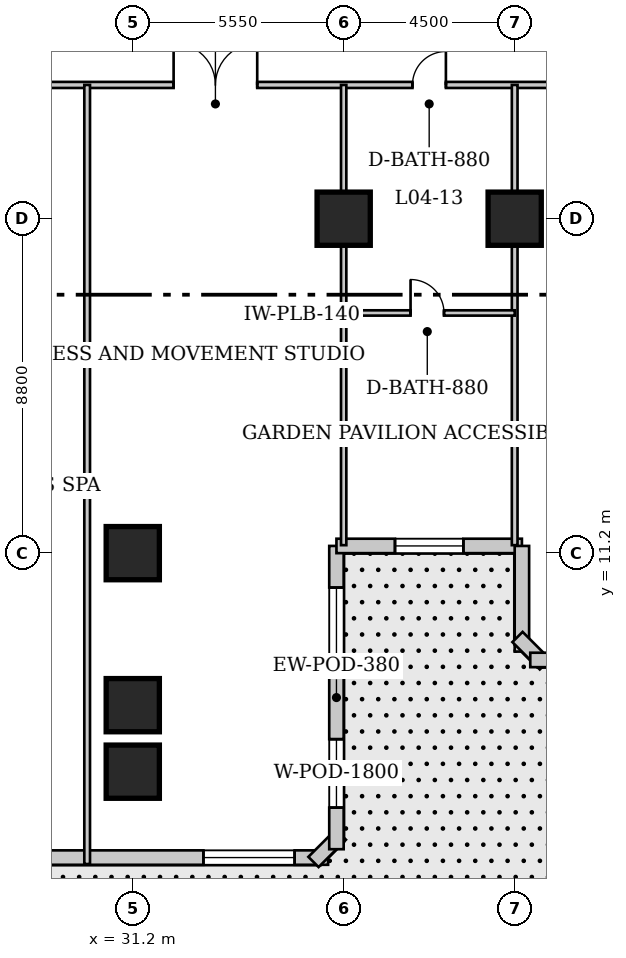
"""IFC4 building model, lengths in metres.
Left out: names, types, materials, properties, quantities, classifications, styles, units other than length and angle.
Written with IfcOpenShell. Run it as: python <this file> out.ifc"""

import sys

from ifc_helpers import new_model, si_unit, direction, frame, frame_2d, origin, origin_2d, place, context, subcontext, project, spatial, rectangle, extrude, element, fill, save


model = new_model("IFC4")
c1 = context("Model", 3, precision=1e-05, world=origin(), true_north=direction((0.0, 1.0)))
c2 = subcontext(c1, "Body", "Model", "MODEL_VIEW")
j1 = project(units=[si_unit("LENGTHUNIT", "METRE"), si_unit("PLANEANGLEUNIT", "RADIAN")], contexts=[c1])
p1 = place(None, origin())
s1 = spatial("IfcSite", under=j1, at=p1, CompositionType="ELEMENT")
p2 = place(p1, origin())
s2 = spatial("IfcBuilding", under=s1, at=p2, CompositionType="ELEMENT")
p3 = place(p2, frame((0.0, 0.0, 20.8)))
s3 = spatial("IfcBuildingStorey", under=s2, at=p3, CompositionType="ELEMENT", Elevation=20.8)
for number, where, z_axis, x_axis in (
    (1, (31.2, 11.2, 0.0), (0.0, 0.0, 1.0), (1.0, 0.0, 0.0)),
    (2, (36.75, 20.0, 0.0), (0.0, 0.0, 1.0), (1.0, 0.0, 0.0)),
    (3, (41.25, 20.0, 0.0), (0.0, 0.0, 1.0), (1.0, 0.0, 0.0)),
    (4, (31.2, 7.2, 0.0), (0.0, 0.0, 1.0), (1.0, 0.0, 0.0)),
    (5, (31.2, 5.45, 0.0), (0.0, 0.0, 1.0), (1.0, 0.0, 0.0)),
):
    element("IfcColumn", number, at=place(p3, frame(where, z_axis=z_axis, x_axis=x_axis)), inside=s3, PredefinedType="COLUMN", context=c2, shape_type="SweptSolid", body=[
        extrude(rectangle(XDim=1.4, YDim=1.4, at=origin_2d()), origin(), (0.0, 0.0, 1.0), 5.2),
    ])
p4 = place(p3, frame((7.21, 3.19, 0.0), z_axis=(0.0, 0.0, 1.0), x_axis=(1.0, 0.0, 0.0)))
e6 = element("IfcWall", 6, at=p4, inside=s3, PredefinedType="SOLIDWALL", context=c2, shape_type="SweptSolid", body=[
    extrude(rectangle(XDim=29.13, YDim=0.38, at=frame_2d((14.565, 0.0))), origin(), (0.0, 0.0, 1.0), 4.94),
])
p5 = place(p4, frame((13.865, 0.0, 0.0)))
e7 = element("IfcOpeningElement", 7, at=p5, cuts=e6, PredefinedType="OPENING", context=c2, shape_type="SweptSolid", body=[
    extrude(rectangle(XDim=1.4, YDim=2.15, at=frame_2d((0.7, 1.075))), frame((0.0, 0.2, 0.0), z_axis=(0.0, -1.0, 0.0), x_axis=(1.0, 0.0, 0.0)), (0.0, 0.0, 1.0), 0.4),
])
p6 = place(p4, frame((9.204, 0.0, 0.75)))
e8 = element("IfcOpeningElement", 8, at=p6, cuts=e6, PredefinedType="OPENING", context=c2, shape_type="SweptSolid", body=[
    extrude(rectangle(XDim=2.4, YDim=2.2, at=frame_2d((1.2, 1.1))), frame((0.0, 0.2, 0.0), z_axis=(0.0, -1.0, 0.0), x_axis=(1.0, 0.0, 0.0)), (0.0, 0.0, 1.0), 0.4),
])
p7 = place(p4, frame((17.526, 0.0, 0.75)))
e9 = element("IfcOpeningElement", 9, at=p7, cuts=e6, PredefinedType="OPENING", context=c2, shape_type="SweptSolid", body=[
    extrude(rectangle(XDim=2.4, YDim=2.2, at=frame_2d((1.2, 1.1))), frame((0.0, 0.2, 0.0), z_axis=(0.0, -1.0, 0.0), x_axis=(1.0, 0.0, 0.0)), (0.0, 0.0, 1.0), 0.4),
])
p8 = place(p4, frame((25.849, 0.0, 0.75)))
e10 = element("IfcOpeningElement", 10, at=p8, cuts=e6, PredefinedType="OPENING", context=c2, shape_type="SweptSolid", body=[
    extrude(rectangle(XDim=2.4, YDim=2.2, at=frame_2d((1.2, 1.1))), frame((0.0, 0.2, 0.0), z_axis=(0.0, -1.0, 0.0), x_axis=(1.0, 0.0, 0.0)), (0.0, 0.0, 1.0), 0.4),
])
p9 = place(p3, frame((35.956, 3.074, 0.0), z_axis=(0.0, 0.0, 1.0), x_axis=(0.707106781187, 0.707106781187, 0.0)))
e11 = element("IfcWall", 11, at=p9, inside=s3, PredefinedType="SOLIDWALL", context=c2, shape_type="SweptSolid", body=[
    extrude(rectangle(XDim=1.019, YDim=0.38, at=frame_2d((0.509, 0.0))), origin(), (0.0, 0.0, 1.0), 4.94),
])
p10 = place(p3, frame((36.56, 3.41, 0.0), z_axis=(0.0, 0.0, 1.0), x_axis=(0.0, 1.0, 0.0)))
e12 = element("IfcWall", 12, at=p10, inside=s3, PredefinedType="SOLIDWALL", context=c2, shape_type="SweptSolid", body=[
    extrude(rectangle(XDim=7.98, YDim=0.38, at=frame_2d((3.99, 0.0))), origin(), (0.0, 0.0, 1.0), 4.94),
])
p11 = place(p10, frame((1.095, 0.0, 0.8)))
e13 = element("IfcOpeningElement", 13, at=p11, cuts=e12, PredefinedType="OPENING", context=c2, shape_type="SweptSolid", body=[
    extrude(rectangle(XDim=1.8, YDim=2.1, at=frame_2d((0.9, 1.05))), frame((0.0, 0.2, 0.0), z_axis=(0.0, -1.0, 0.0), x_axis=(1.0, 0.0, 0.0)), (0.0, 0.0, 1.0), 0.4),
])
p12 = place(p10, frame((5.085, 0.0, 0.8)))
e14 = element("IfcOpeningElement", 14, at=p12, cuts=e12, PredefinedType="OPENING", context=c2, shape_type="SweptSolid", body=[
    extrude(rectangle(XDim=1.8, YDim=2.1, at=frame_2d((0.9, 1.05))), frame((0.0, 0.2, 0.0), z_axis=(0.0, -1.0, 0.0), x_axis=(1.0, 0.0, 0.0)), (0.0, 0.0, 1.0), 0.4),
])
p13 = place(p3, frame((36.56, 11.39, 0.0), z_axis=(0.0, 0.0, 1.0), x_axis=(1.0, 0.0, 0.0)))
e15 = element("IfcWall", 15, at=p13, inside=s3, PredefinedType="SOLIDWALL", context=c2, shape_type="SweptSolid", body=[
    extrude(rectangle(XDim=4.88, YDim=0.38, at=frame_2d((2.44, 0.0))), origin(), (0.0, 0.0, 1.0), 4.94),
])
p14 = place(p13, frame((1.54, 0.0, 0.8)))
e16 = element("IfcOpeningElement", 16, at=p14, cuts=e15, PredefinedType="OPENING", context=c2, shape_type="SweptSolid", body=[
    extrude(rectangle(XDim=1.8, YDim=2.1, at=frame_2d((0.9, 1.05))), frame((0.0, 0.2, 0.0), z_axis=(0.0, -1.0, 0.0), x_axis=(1.0, 0.0, 0.0)), (0.0, 0.0, 1.0), 0.4),
])
p15 = place(p3, frame((41.44, 11.39, 0.0), z_axis=(0.0, 0.0, 1.0), x_axis=(0.0, -1.0, 0.0)))
e17 = element("IfcWall", 17, at=p15, inside=s3, PredefinedType="SOLIDWALL", context=c2, shape_type="SweptSolid", body=[
    extrude(rectangle(XDim=2.78, YDim=0.38, at=frame_2d((1.39, 0.0))), origin(), (0.0, 0.0, 1.0), 4.94),
])
p16 = place(p3, frame((41.324, 8.994, 0.0), z_axis=(0.0, 0.0, 1.0), x_axis=(0.707106781187, -0.707106781187, 0.0)))
e18 = element("IfcWall", 18, at=p16, inside=s3, PredefinedType="SOLIDWALL", context=c2, shape_type="SweptSolid", body=[
    extrude(rectangle(XDim=1.019, YDim=0.38, at=frame_2d((0.509, 0.0))), origin(), (0.0, 0.0, 1.0), 4.94),
])
p17 = place(p3, frame((41.66, 8.39, 0.0), z_axis=(0.0, 0.0, 1.0), x_axis=(1.0, 0.0, 0.0)))
e19 = element("IfcWall", 19, at=p17, inside=s3, PredefinedType="SOLIDWALL", context=c2, shape_type="SweptSolid", body=[
    extrude(rectangle(XDim=29.13, YDim=0.38, at=frame_2d((14.565, 0.0))), origin(), (0.0, 0.0, 1.0), 4.94),
])
p18 = place(p17, frame((0.881, 0.0, 0.75)))
e20 = element("IfcOpeningElement", 20, at=p18, cuts=e19, PredefinedType="OPENING", context=c2, shape_type="SweptSolid", body=[
    extrude(rectangle(XDim=2.4, YDim=2.2, at=frame_2d((1.2, 1.1))), frame((0.0, 0.2, 0.0), z_axis=(0.0, -1.0, 0.0), x_axis=(1.0, 0.0, 0.0)), (0.0, 0.0, 1.0), 0.4),
])
p19 = place(p17, frame((6.192, 0.0, 0.75)))
e21 = element("IfcOpeningElement", 21, at=p19, cuts=e19, PredefinedType="OPENING", context=c2, shape_type="SweptSolid", body=[
    extrude(rectangle(XDim=2.4, YDim=2.2, at=frame_2d((1.2, 1.1))), frame((0.0, 0.2, 0.0), z_axis=(0.0, -1.0, 0.0), x_axis=(1.0, 0.0, 0.0)), (0.0, 0.0, 1.0), 0.4),
])
p20 = place(p17, frame((9.204, 0.0, 0.75)))
e22 = element("IfcOpeningElement", 22, at=p20, cuts=e19, PredefinedType="OPENING", context=c2, shape_type="SweptSolid", body=[
    extrude(rectangle(XDim=2.4, YDim=2.2, at=frame_2d((1.2, 1.1))), frame((0.0, 0.2, 0.0), z_axis=(0.0, -1.0, 0.0), x_axis=(1.0, 0.0, 0.0)), (0.0, 0.0, 1.0), 0.4),
])
p21 = place(p17, frame((14.015, 0.0, 0.75)))
e23 = element("IfcOpeningElement", 23, at=p21, cuts=e19, PredefinedType="OPENING", context=c2, shape_type="SweptSolid", body=[
    extrude(rectangle(XDim=2.4, YDim=2.2, at=frame_2d((1.2, 1.1))), frame((0.0, 0.2, 0.0), z_axis=(0.0, -1.0, 0.0), x_axis=(1.0, 0.0, 0.0)), (0.0, 0.0, 1.0), 0.4),
])
p22 = place(p17, frame((17.526, 0.0, 0.75)))
e24 = element("IfcOpeningElement", 24, at=p22, cuts=e19, PredefinedType="OPENING", context=c2, shape_type="SweptSolid", body=[
    extrude(rectangle(XDim=2.4, YDim=2.2, at=frame_2d((1.2, 1.1))), frame((0.0, 0.2, 0.0), z_axis=(0.0, -1.0, 0.0), x_axis=(1.0, 0.0, 0.0)), (0.0, 0.0, 1.0), 0.4),
])
p23 = place(p17, frame((21.688, 0.0, 0.75)))
e25 = element("IfcOpeningElement", 25, at=p23, cuts=e19, PredefinedType="OPENING", context=c2, shape_type="SweptSolid", body=[
    extrude(rectangle(XDim=2.4, YDim=2.2, at=frame_2d((1.2, 1.1))), frame((0.0, 0.2, 0.0), z_axis=(0.0, -1.0, 0.0), x_axis=(1.0, 0.0, 0.0)), (0.0, 0.0, 1.0), 0.4),
])
p24 = place(p17, frame((25.849, 0.0, 0.75)))
e26 = element("IfcOpeningElement", 26, at=p24, cuts=e19, PredefinedType="OPENING", context=c2, shape_type="SweptSolid", body=[
    extrude(rectangle(XDim=2.4, YDim=2.2, at=frame_2d((1.2, 1.1))), frame((0.0, 0.2, 0.0), z_axis=(0.0, -1.0, 0.0), x_axis=(1.0, 0.0, 0.0)), (0.0, 0.0, 1.0), 0.4),
])
p25 = place(p3, frame((3.22, 23.52, 0.0), z_axis=(0.0, 0.0, 1.0), x_axis=(1.0, 0.0, 0.0)))
e27 = element("IfcWall", 27, at=p25, inside=s3, PredefinedType="PARTITIONING", context=c2, shape_type="SweptSolid", body=[
    extrude(rectangle(XDim=71.56, YDim=0.16, at=frame_2d((35.78, 0.0))), origin(), (0.0, 0.0, 1.0), 4.94),
])
p26 = place(p25, frame((2.19, 0.0, 0.0)))
e28 = element("IfcOpeningElement", 28, at=p26, cuts=e27, PredefinedType="OPENING", context=c2, shape_type="SweptSolid", body=[
    extrude(rectangle(XDim=1.0, YDim=2.15, at=frame_2d((0.5, 1.075))), frame((0.0, 0.09, 0.0), z_axis=(0.0, -1.0, 0.0), x_axis=(1.0, 0.0, 0.0)), (0.0, 0.0, 1.0), 0.18),
])
p27 = place(p25, frame((5.76, 0.0, 0.0)))
e29 = element("IfcOpeningElement", 29, at=p27, cuts=e27, PredefinedType="OPENING", context=c2, shape_type="SweptSolid", body=[
    extrude(rectangle(XDim=1.1, YDim=2.15, at=frame_2d((0.55, 1.075))), frame((0.0, 0.09, 0.0), z_axis=(0.0, -1.0, 0.0), x_axis=(1.0, 0.0, 0.0)), (0.0, 0.0, 1.0), 0.18),
])
p28 = place(p25, frame((9.005, 0.0, 0.0)))
e30 = element("IfcOpeningElement", 30, at=p28, cuts=e27, PredefinedType="OPENING", context=c2, shape_type="SweptSolid", body=[
    extrude(rectangle(XDim=0.95, YDim=2.1, at=frame_2d((0.475, 1.05))), frame((0.0, 0.09, 0.0), z_axis=(0.0, -1.0, 0.0), x_axis=(1.0, 0.0, 0.0)), (0.0, 0.0, 1.0), 0.18),
])
p29 = place(p25, frame((20.43, 0.0, 0.0)))
e31 = element("IfcOpeningElement", 31, at=p29, cuts=e27, PredefinedType="OPENING", context=c2, shape_type="SweptSolid", body=[
    extrude(rectangle(XDim=2.2, YDim=2.4, at=frame_2d((1.1, 1.2))), frame((0.0, 0.09, 0.0), z_axis=(0.0, -1.0, 0.0), x_axis=(1.0, 0.0, 0.0)), (0.0, 0.0, 1.0), 0.18),
])
p30 = place(p25, frame((29.055, 0.0, 0.0)))
e32 = element("IfcOpeningElement", 32, at=p30, cuts=e27, PredefinedType="OPENING", context=c2, shape_type="SweptSolid", body=[
    extrude(rectangle(XDim=2.2, YDim=2.4, at=frame_2d((1.1, 1.2))), frame((0.0, 0.09, 0.0), z_axis=(0.0, -1.0, 0.0), x_axis=(1.0, 0.0, 0.0)), (0.0, 0.0, 1.0), 0.18),
])
p31 = place(p25, frame((47.505, 0.0, 0.0)))
e33 = element("IfcOpeningElement", 33, at=p31, cuts=e27, PredefinedType="OPENING", context=c2, shape_type="SweptSolid", body=[
    extrude(rectangle(XDim=2.2, YDim=2.4, at=frame_2d((1.1, 1.2))), frame((0.0, 0.09, 0.0), z_axis=(0.0, -1.0, 0.0), x_axis=(1.0, 0.0, 0.0)), (0.0, 0.0, 1.0), 0.18),
])
p32 = place(p25, frame((64.03, 0.0, 0.0)))
e34 = element("IfcOpeningElement", 34, at=p32, cuts=e27, PredefinedType="OPENING", context=c2, shape_type="SweptSolid", body=[
    extrude(rectangle(XDim=2.2, YDim=2.4, at=frame_2d((1.1, 1.2))), frame((0.0, 0.09, 0.0), z_axis=(0.0, -1.0, 0.0), x_axis=(1.0, 0.0, 0.0)), (0.0, 0.0, 1.0), 0.18),
])
p33 = place(p25, frame((35.34, 0.0, 0.0)))
e35 = element("IfcOpeningElement", 35, at=p33, cuts=e27, PredefinedType="OPENING", context=c2, shape_type="SweptSolid", body=[
    extrude(rectangle(XDim=0.88, YDim=2.05, at=frame_2d((0.44, 1.025))), frame((0.0, 0.09, 0.0), z_axis=(0.0, -1.0, 0.0), x_axis=(1.0, 0.0, 0.0)), (0.0, 0.0, 1.0), 0.18),
])
p34 = place(p3, frame((30.0, 3.02, 0.0), z_axis=(0.0, 0.0, 1.0), x_axis=(0.0, 1.0, 0.0)))
e36 = element("IfcWall", 36, at=p34, inside=s3, PredefinedType="PARTITIONING", context=c2, shape_type="SweptSolid", body=[
    extrude(rectangle(XDim=20.5, YDim=0.15, at=frame_2d((10.25, 0.0))), origin(), (0.0, 0.0, 1.0), 4.94),
])
p35 = place(p3, frame((41.25, 11.41, 0.0), z_axis=(0.0, 0.0, 1.0), x_axis=(0.0, 1.0, 0.0)))
e37 = element("IfcWall", 37, at=p35, inside=s3, PredefinedType="PARTITIONING", context=c2, shape_type="SweptSolid", body=[
    extrude(rectangle(XDim=12.11, YDim=0.15, at=frame_2d((6.055, 0.0))), origin(), (0.0, 0.0, 1.0), 4.94),
])
p36 = place(p3, frame((36.75, 11.41, 0.0), z_axis=(0.0, 0.0, 1.0), x_axis=(0.0, 1.0, 0.0)))
e38 = element("IfcWall", 38, at=p36, inside=s3, PredefinedType="PLUMBINGWALL", context=c2, shape_type="SweptSolid", body=[
    extrude(rectangle(XDim=12.11, YDim=0.14, at=frame_2d((6.055, 0.0))), origin(), (0.0, 0.0, 1.0), 4.94),
])
p37 = place(p3, frame((36.75, 17.52, 0.0), z_axis=(0.0, 0.0, 1.0), x_axis=(1.0, 0.0, 0.0)))
e39 = element("IfcWall", 39, at=p37, inside=s3, PredefinedType="PLUMBINGWALL", context=c2, shape_type="SweptSolid", body=[
    extrude(rectangle(XDim=4.5, YDim=0.14, at=frame_2d((2.25, 0.0))), origin(), (0.0, 0.0, 1.0), 4.94),
])
p38 = place(p37, frame((1.76, 0.0, 0.0)))
e40 = element("IfcOpeningElement", 40, at=p38, cuts=e39, PredefinedType="OPENING", context=c2, shape_type="SweptSolid", body=[
    extrude(rectangle(XDim=0.88, YDim=2.05, at=frame_2d((0.44, 1.025))), frame((0.0, 0.08, 0.0), z_axis=(0.0, -1.0, 0.0), x_axis=(1.0, 0.0, 0.0)), (0.0, 0.0, 1.0), 0.16),
])
p39 = place(p8, origin())
e41 = element("IfcWindow", 41, at=p39, inside=s3, PartitioningType="SINGLE_PANEL", PredefinedType="WINDOW", context=c2, shape_type="SweptSolid", body=[
    extrude(rectangle(XDim=2.4, YDim=2.2, at=frame_2d((1.2, 1.1))), frame((0.0, 0.03, 0.0), z_axis=(0.0, -1.0, 0.0), x_axis=(1.0, 0.0, 0.0)), (0.0, 0.0, 1.0), 0.06),
])
fill(e10, e41)
p40 = place(p11, origin())
e42 = element("IfcWindow", 42, at=p40, inside=s3, PartitioningType="SINGLE_PANEL", PredefinedType="WINDOW", context=c2, shape_type="SweptSolid", body=[
    extrude(rectangle(XDim=1.8, YDim=2.1, at=frame_2d((0.9, 1.05))), frame((0.0, 0.03, 0.0), z_axis=(0.0, -1.0, 0.0), x_axis=(1.0, 0.0, 0.0)), (0.0, 0.0, 1.0), 0.06),
])
fill(e13, e42)
p41 = place(p12, origin())
e43 = element("IfcWindow", 43, at=p41, inside=s3, PartitioningType="SINGLE_PANEL", PredefinedType="WINDOW", context=c2, shape_type="SweptSolid", body=[
    extrude(rectangle(XDim=1.8, YDim=2.1, at=frame_2d((0.9, 1.05))), frame((0.0, 0.03, 0.0), z_axis=(0.0, -1.0, 0.0), x_axis=(1.0, 0.0, 0.0)), (0.0, 0.0, 1.0), 0.06),
])
fill(e14, e43)
p42 = place(p14, origin())
e44 = element("IfcWindow", 44, at=p42, inside=s3, PartitioningType="SINGLE_PANEL", PredefinedType="WINDOW", context=c2, shape_type="SweptSolid", body=[
    extrude(rectangle(XDim=1.8, YDim=2.1, at=frame_2d((0.9, 1.05))), frame((0.0, 0.03, 0.0), z_axis=(0.0, -1.0, 0.0), x_axis=(1.0, 0.0, 0.0)), (0.0, 0.0, 1.0), 0.06),
])
fill(e16, e44)
p43 = place(p30, origin())
e45 = element("IfcDoor", 45, at=p43, inside=s3, OperationType="DOUBLE_DOOR_SINGLE_SWING", PredefinedType="DOOR", context=c2, shape_type="SweptSolid", body=[
    extrude(rectangle(XDim=2.2, YDim=2.4, at=frame_2d((1.1, 1.2))), frame((0.0, 0.025, 0.0), z_axis=(0.0, -1.0, 0.0), x_axis=(1.0, 0.0, 0.0)), (0.0, 0.0, 1.0), 0.05),
])
fill(e32, e45)
p44 = place(p33, origin())
e46 = element("IfcDoor", 46, at=p44, inside=s3, OperationType="SINGLE_SWING_RIGHT", PredefinedType="DOOR", context=c2, shape_type="SweptSolid", body=[
    extrude(rectangle(XDim=0.88, YDim=2.05, at=frame_2d((0.44, 1.025))), frame((0.0, 0.025, 0.0), z_axis=(0.0, -1.0, 0.0), x_axis=(1.0, 0.0, 0.0)), (0.0, 0.0, 1.0), 0.05),
])
fill(e35, e46)
p45 = place(p38, origin())
e47 = element("IfcDoor", 47, at=p45, inside=s3, OperationType="SINGLE_SWING_LEFT", PredefinedType="DOOR", context=c2, shape_type="SweptSolid", body=[
    extrude(rectangle(XDim=0.88, YDim=2.05, at=frame_2d((0.44, 1.025))), frame((0.0, 0.025, 0.0), z_axis=(0.0, -1.0, 0.0), x_axis=(1.0, 0.0, 0.0)), (0.0, 0.0, 1.0), 0.05),
])
fill(e40, e47)
save(model, sys.argv[1])
